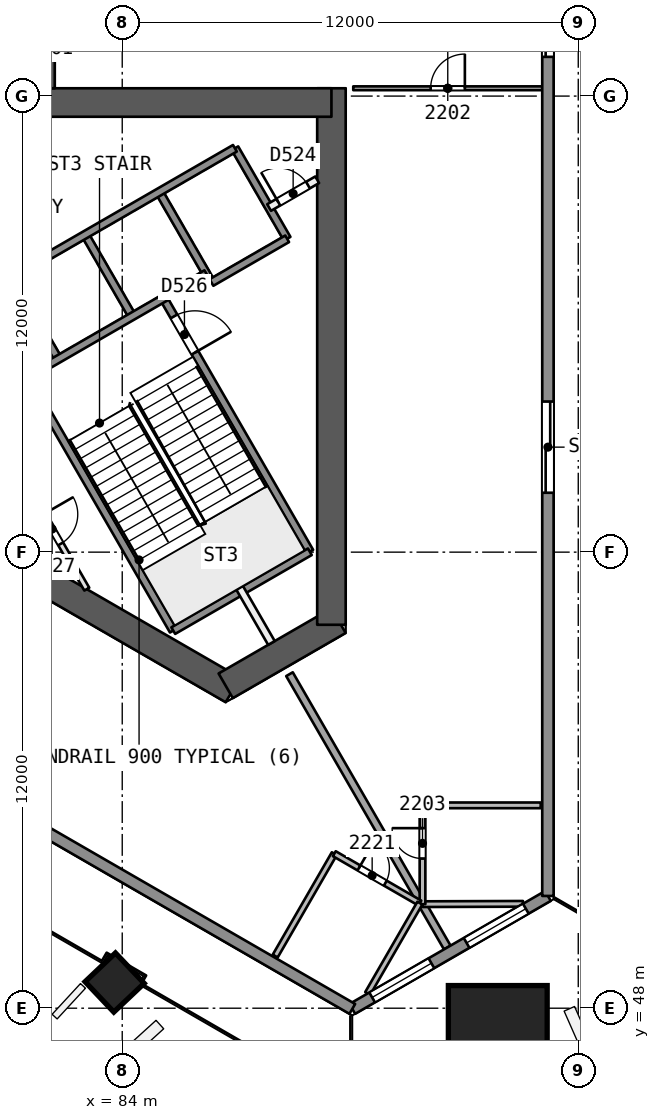
"""IFC4 building model, lengths in metres.
Left out: names, types, materials, properties, quantities, classifications, styles, units other than length and angle.
Written with IfcOpenShell. Run it as: python <this file> out.ifc"""

import sys

from ifc_helpers import new_model, si_unit, direction, frame, frame_2d, origin, origin_2d, place, context, subcontext, project, spatial, rectangle, extrude, element, fill, save


model = new_model("IFC4")
c1 = context("Model", 3, precision=1e-05, world=origin(), true_north=direction((0.0, 1.0)))
c2 = subcontext(c1, "Body", "Model", "MODEL_VIEW")
j1 = project(units=[si_unit("LENGTHUNIT", "METRE"), si_unit("PLANEANGLEUNIT", "RADIAN")], contexts=[c1])
p1 = place(None, origin())
s1 = spatial("IfcSite", under=j1, at=p1, CompositionType="ELEMENT")
p2 = place(p1, origin())
s2 = spatial("IfcBuilding", under=s1, at=p2, CompositionType="ELEMENT")
p3 = place(p2, frame((0.0, 0.0, 94.3)))
s3 = spatial("IfcBuildingStorey", under=s2, at=p3, CompositionType="ELEMENT", Elevation=94.3)
p4 = place(p3, frame((74.822, 63.354, 0.0), z_axis=(0.0, 0.0, 1.0), x_axis=(0.8660248072, -0.500001033313, 0.0)))
e1 = element("IfcWall", 1, at=p4, inside=s3, PredefinedType="SHEAR", context=c2, shape_type="SweptSolid", body=[
    extrude(rectangle(XDim=13.958, YDim=0.75, at=frame_2d((6.979, 0.0))), origin(), (0.0, 0.0, 1.0), 3.7),
])
p5 = place(p3, frame((86.723, 56.483, 0.0), z_axis=(0.0, 0.0, 1.0), x_axis=(0.866017201164, 0.500014207086, 0.0)))
e2 = element("IfcWall", 2, at=p5, inside=s3, PredefinedType="SHEAR", context=c2, shape_type="SweptSolid", body=[
    extrude(rectangle(XDim=3.429, YDim=0.75, at=frame_2d((1.714, 0.0))), origin(), (0.0, 0.0, 1.0), 3.7),
])
p6 = place(p3, frame((89.505, 58.089, 0.0), z_axis=(0.0, 0.0, 1.0), x_axis=(0.0, 1.0, 0.0)))
e3 = element("IfcWall", 3, at=p6, inside=s3, PredefinedType="SHEAR", context=c2, shape_type="SweptSolid", body=[
    extrude(rectangle(XDim=14.117, YDim=0.75, at=frame_2d((7.059, 0.0))), origin(), (0.0, 0.0, 1.0), 3.7),
])
p7 = place(p3, frame((89.505, 71.831, 0.0), z_axis=(0.0, 0.0, 1.0), x_axis=(-1.0, 0.0, 0.0)))
e4 = element("IfcWall", 4, at=p7, inside=s3, PredefinedType="SHEAR", context=c2, shape_type="SweptSolid", body=[
    extrude(rectangle(XDim=10.005, YDim=0.75, at=frame_2d((5.002, 0.0))), origin(), (0.0, 0.0, 1.0), 3.7),
])
p8 = place(p7, frame((7.855, 0.0, 0.0)))
e5 = element("IfcOpeningElement", 5, at=p8, cuts=e4, PredefinedType="OPENING", context=c2, shape_type="SweptSolid", body=[
    extrude(rectangle(XDim=1.2, YDim=2.1, at=frame_2d((0.6, 1.05))), frame((0.0, 0.385, 0.0), z_axis=(0.0, -1.0, 0.0), x_axis=(1.0, 0.0, 0.0)), (0.0, 0.0, 1.0), 0.771),
])
p9 = place(p3, frame((82.1, 72.206, 0.0), z_axis=(0.0, 0.0, 1.0), x_axis=(0.0, 1.0, 0.0)))
e6 = element("IfcWall", 6, at=p9, inside=s3, PredefinedType="SHEAR", context=c2, shape_type="SweptSolid", body=[
    extrude(rectangle(XDim=15.588, YDim=0.25, at=frame_2d((7.794, 0.0))), origin(), (0.0, 0.0, 1.0), 3.25),
])
p10 = place(p9, frame((1.527, 0.0, 0.0)))
e7 = element("IfcOpeningElement", 7, at=p10, cuts=e6, PredefinedType="OPENING", context=c2, shape_type="SweptSolid", body=[
    extrude(rectangle(XDim=1.0, YDim=2.1, at=frame_2d((0.5, 1.05))), frame((0.0, 0.135, 0.0), z_axis=(0.0, -1.0, 0.0), x_axis=(1.0, 0.0, 0.0)), (0.0, 0.0, 1.0), 0.271),
])
p11 = place(p9, frame((8.694, 0.0, 0.0)))
e8 = element("IfcOpeningElement", 8, at=p11, cuts=e6, PredefinedType="OPENING", context=c2, shape_type="SweptSolid", body=[
    extrude(rectangle(XDim=1.1, YDim=2.1, at=frame_2d((0.55, 1.05))), frame((0.0, 0.135, 0.0), z_axis=(0.0, -1.0, 0.0), x_axis=(1.0, 0.0, 0.0)), (0.0, 0.0, 1.0), 0.271),
])
p12 = place(p9, frame((13.062, 0.0, 0.0)))
e9 = element("IfcOpeningElement", 9, at=p12, cuts=e6, PredefinedType="OPENING", context=c2, shape_type="SweptSolid", body=[
    extrude(rectangle(XDim=1.0, YDim=2.1, at=frame_2d((0.5, 1.05))), frame((0.0, 0.135, 0.0), z_axis=(0.0, -1.0, 0.0), x_axis=(1.0, 0.0, 0.0)), (0.0, 0.0, 1.0), 0.271),
])
p13 = place(p3, frame((83.81, 48.642, 0.0), z_axis=(-0.00837646992, 0.028097450282, 0.999570091609), x_axis=(-0.49967642562, -0.865977626468, 0.020154903518)))
e10 = element("IfcColumn", 10, at=p13, inside=s3, PredefinedType="COLUMN", context=c2, shape_type="SweptSolid", body=[
    extrude(rectangle(XDim=1.1, YDim=1.1, at=origin_2d()), origin(), (0.0, 0.0, 1.0), 3.702),
])
p14 = place(p3, frame((93.903, 47.259, 0.0), z_axis=(-0.017607037296, 0.030466109479, 0.999380712447), x_axis=(0.500061328599, -0.865274797998, 0.035187946645)))
e11 = element("IfcColumn", 11, at=p14, inside=s3, PredefinedType="COLUMN", context=c2, shape_type="SweptSolid", body=[
    extrude(rectangle(XDim=2.6, YDim=2.6, at=origin_2d()), origin(), (0.0, 0.0, 1.0), 3.702),
])
p15 = place(p3, frame((90.079, 72.206, 0.0), z_axis=(0.0, 0.0, 1.0), x_axis=(1.0, 0.0, 0.0)))
e12 = element("IfcWall", 12, at=p15, inside=s3, PredefinedType="PARTITIONING", context=c2, shape_type="SweptSolid", body=[
    extrude(rectangle(XDim=4.974, YDim=0.1, at=frame_2d((2.487, 0.0))), origin(), (0.0, 0.0, 1.0), 3.25),
])
p16 = place(p15, frame((2.037, 0.0, 0.0)))
e13 = element("IfcOpeningElement", 13, at=p16, cuts=e12, PredefinedType="OPENING", context=c2, shape_type="SweptSolid", body=[
    extrude(rectangle(XDim=0.9, YDim=2.1, at=frame_2d((0.45, 1.05))), frame((0.0, 0.061, 0.0), z_axis=(0.0, -1.0, 0.0), x_axis=(1.0, 0.0, 0.0)), (0.0, 0.0, 1.0), 0.121),
])
p17 = place(p3, frame((94.545, 50.747, 0.0), z_axis=(0.0, 0.0, 1.0), x_axis=(-0.999994472164, -0.003325002401, 0.0)))
e14 = element("IfcWall", 14, at=p17, inside=s3, PredefinedType="PARTITIONING", context=c2, shape_type="SweptSolid", body=[
    extrude(rectangle(XDim=2.643, YDim=0.15, at=frame_2d((1.322, 0.0))), origin(), (0.0, 0.0, 1.0), 3.25),
])
p18 = place(p3, frame((91.902, 50.738, 0.0), z_axis=(0.0, 0.0, 1.0), x_axis=(0.0, 1.0, 0.0)))
e15 = element("IfcWall", 15, at=p18, inside=s3, PredefinedType="PARTITIONING", context=c2, shape_type="SweptSolid", body=[
    extrude(rectangle(XDim=2.6, YDim=0.15, at=frame_2d((1.3, 0.0))), origin(), (0.0, 0.0, 1.0), 3.25),
])
p19 = place(p18, frame((1.2, 0.0, 0.0)))
e16 = element("IfcOpeningElement", 16, at=p19, cuts=e15, PredefinedType="OPENING", context=c2, shape_type="SweptSolid", body=[
    extrude(rectangle(XDim=0.8, YDim=2.1, at=frame_2d((0.4, 1.05))), frame((0.0, 0.085, 0.0), z_axis=(0.0, -1.0, 0.0), x_axis=(1.0, 0.0, 0.0)), (0.0, 0.0, 1.0), 0.171),
])
p20 = place(p3, frame((91.902, 53.338, 0.0), z_axis=(0.0, 0.0, 1.0), x_axis=(1.0, 0.0, 0.0)))
e17 = element("IfcWall", 17, at=p20, inside=s3, PredefinedType="PARTITIONING", context=c2, shape_type="SweptSolid", body=[
    extrude(rectangle(XDim=3.11, YDim=0.15, at=frame_2d((1.555, 0.0))), origin(), (0.0, 0.0, 1.0), 3.25),
])
p21 = place(p3, frame((88.401, 56.789, 0.0), z_axis=(0.0, 0.0, 1.0), x_axis=(0.499996437432, -0.866027460624, 0.0)))
e18 = element("IfcWall", 18, at=p21, inside=s3, PredefinedType="PARTITIONING", context=c2, shape_type="SweptSolid", body=[
    extrude(rectangle(XDim=8.305, YDim=0.2, at=frame_2d((4.152, 0.0))), origin(), (0.0, 0.0, 1.0), 3.25),
])
p22 = place(p3, frame((88.025, 49.372, 0.0), z_axis=(0.0, 0.0, 1.0), x_axis=(0.500005562063, 0.866022192502, 0.0)))
e19 = element("IfcWall", 19, at=p22, inside=s3, PredefinedType="PARTITIONING", context=c2, shape_type="SweptSolid", body=[
    extrude(rectangle(XDim=3.11, YDim=0.15, at=frame_2d((1.555, 0.0))), origin(), (0.0, 0.0, 1.0), 3.25),
])
p23 = place(p3, frame((89.581, 52.066, 0.0), z_axis=(0.0, 0.0, 1.0), x_axis=(0.866021400173, -0.500006934395, 0.0)))
e20 = element("IfcWall", 20, at=p23, inside=s3, PredefinedType="PARTITIONING", context=c2, shape_type="SweptSolid", body=[
    extrude(rectangle(XDim=2.6, YDim=0.15, at=frame_2d((1.3, 0.0))), origin(), (0.0, 0.0, 1.0), 3.25),
])
p24 = place(p23, frame((0.75, 0.0, 0.0)))
e21 = element("IfcOpeningElement", 21, at=p24, cuts=e20, PredefinedType="OPENING", context=c2, shape_type="SweptSolid", body=[
    extrude(rectangle(XDim=0.8, YDim=2.1, at=frame_2d((0.4, 1.05))), frame((0.0, 0.085, 0.0), z_axis=(0.0, -1.0, 0.0), x_axis=(1.0, 0.0, 0.0)), (0.0, 0.0, 1.0), 0.171),
])
p25 = place(p3, frame((91.832, 50.766, 0.0), z_axis=(0.0, 0.0, 1.0), x_axis=(-0.500002068897, -0.866024209303, 0.0)))
e22 = element("IfcWall", 22, at=p25, inside=s3, PredefinedType="PARTITIONING", context=c2, shape_type="SweptSolid", body=[
    extrude(rectangle(XDim=2.746, YDim=0.15, at=frame_2d((1.373, 0.0))), origin(), (0.0, 0.0, 1.0), 3.25),
])
p26 = place(p3, frame((95.202, 50.954, 0.0), z_axis=(0.0, 0.0, 1.0), x_axis=(-0.866025542078, -0.499999760469, 0.0)))
e23 = element("IfcWall", 23, at=p26, inside=s3, PredefinedType="SOLIDWALL", context=c2, shape_type="SweptSolid", body=[
    extrude(rectangle(XDim=5.944, YDim=0.3, at=frame_2d((2.972, 0.0))), origin(), (0.0, 0.0, 1.0), 3.25),
])
p27 = place(p26, frame((0.671, 0.0, 0.9)))
e24 = element("IfcOpeningElement", 24, at=p27, cuts=e23, PredefinedType="OPENING", context=c2, shape_type="SweptSolid", body=[
    extrude(rectangle(XDim=1.8, YDim=1.5, at=frame_2d((0.9, 0.75))), frame((0.0, 0.161, 0.0), z_axis=(0.0, -1.0, 0.0), x_axis=(1.0, 0.0, 0.0)), (0.0, 0.0, 1.0), 0.321),
])
p28 = place(p26, frame((3.541, 0.0, 0.9)))
e25 = element("IfcOpeningElement", 25, at=p28, cuts=e23, PredefinedType="OPENING", context=c2, shape_type="SweptSolid", body=[
    extrude(rectangle(XDim=1.8, YDim=1.5, at=frame_2d((0.9, 0.75))), frame((0.0, 0.161, 0.0), z_axis=(0.0, -1.0, 0.0), x_axis=(1.0, 0.0, 0.0)), (0.0, 0.0, 1.0), 0.321),
])
p29 = place(p3, frame((95.202, 109.046, 0.0), z_axis=(0.0, 0.0, 1.0), x_axis=(0.0, -1.0, 0.0)))
e26 = element("IfcWall", 26, at=p29, inside=s3, PredefinedType="SOLIDWALL", context=c2, shape_type="SweptSolid", body=[
    extrude(rectangle(XDim=58.093, YDim=0.3, at=frame_2d((29.046, 0.0))), origin(), (0.0, 0.0, 1.0), 3.25),
])
p30 = place(p29, frame((27.846, 0.0, 0.0)))
e27 = element("IfcOpeningElement", 27, at=p30, cuts=e26, PredefinedType="OPENING", context=c2, shape_type="SweptSolid", body=[
    extrude(rectangle(XDim=2.4, YDim=2.4, at=frame_2d((1.2, 1.2))), frame((0.0, 0.161, 0.0), z_axis=(0.0, -1.0, 0.0), x_axis=(1.0, 0.0, 0.0)), (0.0, 0.0, 1.0), 0.321),
])
p31 = place(p29, frame((33.614, 0.0, 0.0)))
e28 = element("IfcOpeningElement", 28, at=p31, cuts=e26, PredefinedType="OPENING", context=c2, shape_type="SweptSolid", body=[
    extrude(rectangle(XDim=2.4, YDim=2.4, at=frame_2d((1.2, 1.2))), frame((0.0, 0.161, 0.0), z_axis=(0.0, -1.0, 0.0), x_axis=(1.0, 0.0, 0.0)), (0.0, 0.0, 1.0), 0.321),
])
p32 = place(p29, frame((45.083, 0.0, 0.0)))
e29 = element("IfcOpeningElement", 29, at=p32, cuts=e26, PredefinedType="OPENING", context=c2, shape_type="SweptSolid", body=[
    extrude(rectangle(XDim=2.4, YDim=2.4, at=frame_2d((1.2, 1.2))), frame((0.0, 0.161, 0.0), z_axis=(0.0, -1.0, 0.0), x_axis=(1.0, 0.0, 0.0)), (0.0, 0.0, 1.0), 0.321),
])
p33 = place(p29, frame((22.079, 0.0, 0.0)))
e30 = element("IfcOpeningElement", 30, at=p33, cuts=e26, PredefinedType="OPENING", context=c2, shape_type="SweptSolid", body=[
    extrude(rectangle(XDim=2.4, YDim=2.4, at=frame_2d((1.2, 1.2))), frame((0.0, 0.161, 0.0), z_axis=(0.0, -1.0, 0.0), x_axis=(1.0, 0.0, 0.0)), (0.0, 0.0, 1.0), 0.321),
])
p34 = place(p29, frame((10.643, 0.0, 0.0)))
e31 = element("IfcOpeningElement", 31, at=p34, cuts=e26, PredefinedType="OPENING", context=c2, shape_type="SweptSolid", body=[
    extrude(rectangle(XDim=2.4, YDim=2.4, at=frame_2d((1.2, 1.2))), frame((0.0, 0.161, 0.0), z_axis=(0.0, -1.0, 0.0), x_axis=(1.0, 0.0, 0.0)), (0.0, 0.0, 1.0), 0.321),
])
p35 = place(p3, frame((90.054, 47.981, 0.0), z_axis=(0.0, 0.0, 1.0), x_axis=(-0.866025390357, 0.500000023256, 0.0)))
e32 = element("IfcWall", 32, at=p35, inside=s3, PredefinedType="SOLIDWALL", context=c2, shape_type="SweptSolid", body=[
    extrude(rectangle(XDim=58.093, YDim=0.3, at=frame_2d((29.046, 0.0))), origin(), (0.0, 0.0, 1.0), 3.25),
])
p36 = place(p35, frame((43.972, 0.0, 0.0)))
e33 = element("IfcOpeningElement", 33, at=p36, cuts=e32, PredefinedType="OPENING", context=c2, shape_type="SweptSolid", body=[
    extrude(rectangle(XDim=2.4, YDim=2.4, at=frame_2d((1.2, 1.2))), frame((0.0, 0.161, 0.0), z_axis=(0.0, -1.0, 0.0), x_axis=(1.0, 0.0, 0.0)), (0.0, 0.0, 1.0), 0.321),
])
p37 = place(p35, frame((22.39, 0.0, 0.0)))
e34 = element("IfcOpeningElement", 34, at=p37, cuts=e32, PredefinedType="OPENING", context=c2, shape_type="SweptSolid", body=[
    extrude(rectangle(XDim=2.4, YDim=2.4, at=frame_2d((1.2, 1.2))), frame((0.0, 0.161, 0.0), z_axis=(0.0, -1.0, 0.0), x_axis=(1.0, 0.0, 0.0)), (0.0, 0.0, 1.0), 0.321),
])
p38 = place(p35, frame((10.643, 0.0, 0.0)))
e35 = element("IfcOpeningElement", 35, at=p38, cuts=e32, PredefinedType="OPENING", context=c2, shape_type="SweptSolid", body=[
    extrude(rectangle(XDim=2.4, YDim=2.4, at=frame_2d((1.2, 1.2))), frame((0.0, 0.161, 0.0), z_axis=(0.0, -1.0, 0.0), x_axis=(1.0, 0.0, 0.0)), (0.0, 0.0, 1.0), 0.321),
])
p39 = place(p35, frame((29.705, 0.0, 0.9)))
e36 = element("IfcOpeningElement", 36, at=p39, cuts=e32, PredefinedType="OPENING", context=c2, shape_type="SweptSolid", body=[
    extrude(rectangle(XDim=1.8, YDim=1.5, at=frame_2d((0.9, 0.75))), frame((0.0, 0.161, 0.0), z_axis=(0.0, -1.0, 0.0), x_axis=(1.0, 0.0, 0.0)), (0.0, 0.0, 1.0), 0.321),
])
p40 = place(p35, frame((26.587, 0.0, 0.9)))
e37 = element("IfcOpeningElement", 37, at=p40, cuts=e32, PredefinedType="OPENING", context=c2, shape_type="SweptSolid", body=[
    extrude(rectangle(XDim=1.8, YDim=1.5, at=frame_2d((0.9, 0.75))), frame((0.0, 0.161, 0.0), z_axis=(0.0, -1.0, 0.0), x_axis=(1.0, 0.0, 0.0)), (0.0, 0.0, 1.0), 0.321),
])
p41 = place(p3, frame((81.269, 62.142, 0.0), z_axis=(0.0, 0.0, 1.0), x_axis=(0.500043557135, -0.866000254601, 0.0)))
e38 = element("IfcWall", 38, at=p41, inside=s3, PredefinedType="PARTITIONING", context=c2, shape_type="SweptSolid", body=[
    extrude(rectangle(XDim=3.598, YDim=0.15, at=frame_2d((1.799, 0.0))), origin(), (0.0, 0.0, 1.0), 3.25),
])
p42 = place(p41, frame((1.322, 0.0, 0.0)))
e39 = element("IfcOpeningElement", 39, at=p42, cuts=e38, PredefinedType="OPENING", context=c2, shape_type="SweptSolid", body=[
    extrude(rectangle(XDim=0.9, YDim=2.1, at=frame_2d((0.45, 1.05))), frame((0.0, 0.085, 0.0), z_axis=(0.0, -1.0, 0.0), x_axis=(1.0, 0.0, 0.0)), (0.0, 0.0, 1.0), 0.171),
])
p43 = place(p3, frame((81.493, 64.604, 0.0), z_axis=(0.0, 0.0, 1.0), x_axis=(0.500006057782, -0.866021906294, 0.0)))
e40 = element("IfcWall", 40, at=p43, inside=s3, PredefinedType="SOLIDWALL", context=c2, shape_type="SweptSolid", body=[
    extrude(rectangle(XDim=7.7, YDim=0.2, at=frame_2d((3.85, 0.0))), origin(), (0.0, 0.0, 1.0), 3.25),
])
p44 = place(p3, frame((81.076, 67.227, 0.0), z_axis=(0.0, 0.0, 1.0), x_axis=(0.50000366821, -0.866023285932, 0.0)))
e41 = element("IfcWall", 41, at=p44, inside=s3, PredefinedType="SOLIDWALL", context=c2, shape_type="SweptSolid", body=[
    extrude(rectangle(XDim=2.48, YDim=0.2, at=frame_2d((1.24, 0.0))), origin(), (0.0, 0.0, 1.0), 3.25),
])
p45 = place(p3, frame((87.09, 59.06, 0.0), z_axis=(0.0, 0.0, 1.0), x_axis=(0.499937194881, -0.866061661301, 0.0)))
e42 = element("IfcWall", 42, at=p45, inside=s3, PredefinedType="PARTITIONING", context=c2, shape_type="SweptSolid", body=[
    extrude(rectangle(XDim=1.673, YDim=0.2, at=frame_2d((0.836, 0.0))), origin(), (0.0, 0.0, 1.0), 3.25),
])
p46 = place(p3, frame((83.024, 68.352, 0.0), z_axis=(0.0, 0.0, 1.0), x_axis=(0.50000366821, -0.866023285932, 0.0)))
e43 = element("IfcWall", 43, at=p46, inside=s3, PredefinedType="SOLIDWALL", context=c2, shape_type="SweptSolid", body=[
    extrude(rectangle(XDim=2.48, YDim=0.2, at=frame_2d((1.24, 0.0))), origin(), (0.0, 0.0, 1.0), 3.25),
])
p47 = place(p3, frame((85.087, 66.679, 0.0), z_axis=(0.0, 0.0, 1.0), x_axis=(0.500019787375, -0.866013979237, 0.0)))
e44 = element("IfcWall", 44, at=p47, inside=s3, PredefinedType="SOLIDWALL", context=c2, shape_type="SweptSolid", body=[
    extrude(rectangle(XDim=7.7, YDim=0.2, at=frame_2d((3.85, 0.0))), origin(), (0.0, 0.0, 1.0), 3.25),
])
p48 = place(p47, frame((0.55, 0.0, 0.0)))
e45 = element("IfcOpeningElement", 45, at=p48, cuts=e44, PredefinedType="OPENING", context=c2, shape_type="SweptSolid", body=[
    extrude(rectangle(XDim=1.1, YDim=2.1, at=frame_2d((0.55, 1.05))), frame((0.0, 0.11, 0.0), z_axis=(0.0, -1.0, 0.0), x_axis=(1.0, 0.0, 0.0)), (0.0, 0.0, 1.0), 0.221),
])
for number, where, z_axis, x_axis in (
    (46, (84.973, 69.477, 0.0), (0.0, 0.0, 1.0), (0.5, -0.866, 0.0)),
    (47, (86.965, 70.626, 0.0), (0.0, 0.0, 1.0), (0.5, -0.866, 0.0)),
):
    element("IfcWall", number, at=place(p3, frame(where, z_axis=z_axis, x_axis=x_axis)), inside=s3, PredefinedType="SOLIDWALL", context=c2, shape_type="SweptSolid", body=[
        extrude(rectangle(XDim=2.75, YDim=0.2, at=frame_2d((1.375, 0.0))), origin(), (0.0, 0.0, 1.0), 3.25),
    ])
p49 = place(p3, frame((77.135, 64.952, 0.0), z_axis=(0.0, 0.0, 1.0), x_axis=(0.866031916153, 0.499988720078, 0.0)))
e48 = element("IfcWall", 48, at=p49, inside=s3, PredefinedType="SOLIDWALL", context=c2, shape_type="SweptSolid", body=[
    extrude(rectangle(XDim=11.35, YDim=0.2, at=frame_2d((5.675, 0.0))), origin(), (0.0, 0.0, 1.0), 3.25),
])
p50 = place(p3, frame((87.865, 69.068, 0.0), z_axis=(0.0, 0.0, 1.0), x_axis=(0.865982457891, 0.500074377092, 0.0)))
e49 = element("IfcWall", 49, at=p50, inside=s3, PredefinedType="PARTITIONING", context=c2, shape_type="SweptSolid", body=[
    extrude(rectangle(XDim=1.461, YDim=0.2, at=frame_2d((0.73, 0.0))), origin(), (0.0, 0.0, 1.0), 3.25),
])
p51 = place(p50, frame((0.281, 0.0, 0.0)))
e50 = element("IfcOpeningElement", 50, at=p51, cuts=e49, PredefinedType="OPENING", context=c2, shape_type="SweptSolid", body=[
    extrude(rectangle(XDim=0.9, YDim=2.1, at=frame_2d((0.45, 1.05))), frame((0.0, 0.11, 0.0), z_axis=(0.0, -1.0, 0.0), x_axis=(1.0, 0.0, 0.0)), (0.0, 0.0, 1.0), 0.221),
])
p52 = place(p3, frame((80.367, 63.954, 0.0), z_axis=(0.0, 0.0, 1.0), x_axis=(0.866026575979, 0.499997969693, 0.0)))
e51 = element("IfcWall", 51, at=p52, inside=s3, PredefinedType="SOLIDWALL", context=c2, shape_type="SweptSolid", body=[
    extrude(rectangle(XDim=6.75, YDim=0.2, at=frame_2d((3.375, 0.0))), origin(), (0.0, 0.0, 1.0), 3.25),
])
p53 = place(p3, frame((86.348, 67.095, 0.0), z_axis=(0.0, 0.0, 1.0), x_axis=(0.86602648383, 0.499998129301, 0.0)))
e52 = element("IfcWall", 52, at=p53, inside=s3, PredefinedType="SOLIDWALL", context=c2, shape_type="SweptSolid", body=[
    extrude(rectangle(XDim=2.3, YDim=0.2, at=frame_2d((1.15, 0.0))), origin(), (0.0, 0.0, 1.0), 3.25),
])
p54 = place(p3, frame((85.343, 57.935, 0.0), z_axis=(0.0, 0.0, 1.0), x_axis=(0.866004344652, 0.500036473714, 0.0)))
e53 = element("IfcWall", 53, at=p54, inside=s3, PredefinedType="SOLIDWALL", context=c2, shape_type="SweptSolid", body=[
    extrude(rectangle(XDim=4.15, YDim=0.2, at=frame_2d((2.075, 0.0))), origin(), (0.0, 0.0, 1.0), 3.25),
])
p55 = place(p16, origin())
e54 = element("IfcDoor", 54, at=p55, inside=s3, OperationType="SINGLE_SWING_RIGHT", PredefinedType="NOTDEFINED", context=c2, shape_type="SweptSolid", body=[
    extrude(rectangle(XDim=0.9, YDim=2.1, at=frame_2d((0.45, 1.05))), frame((0.0, 0.025, 0.0), z_axis=(0.0, -1.0, 0.0), x_axis=(1.0, 0.0, 0.0)), (0.0, 0.0, 1.0), 0.05),
])
fill(e13, e54)
p56 = place(p19, origin())
e55 = element("IfcDoor", 55, at=p56, inside=s3, OperationType="SINGLE_SWING_RIGHT", PredefinedType="NOTDEFINED", context=c2, shape_type="SweptSolid", body=[
    extrude(rectangle(XDim=0.8, YDim=2.1, at=frame_2d((0.4, 1.05))), frame((0.0, 0.025, 0.0), z_axis=(0.0, -1.0, 0.0), x_axis=(1.0, 0.0, 0.0)), (0.0, 0.0, 1.0), 0.05),
])
fill(e16, e55)
p57 = place(p24, origin())
e56 = element("IfcDoor", 56, at=p57, inside=s3, OperationType="SINGLE_SWING_LEFT", PredefinedType="NOTDEFINED", context=c2, shape_type="SweptSolid", body=[
    extrude(rectangle(XDim=0.8, YDim=2.1, at=frame_2d((0.4, 1.05))), frame((0.0, 0.025, 0.0), z_axis=(0.0, -1.0, 0.0), x_axis=(1.0, 0.0, 0.0)), (0.0, 0.0, 1.0), 0.05),
])
fill(e21, e56)
p58 = place(p27, origin())
e57 = element("IfcWindow", 57, at=p58, inside=s3, PartitioningType="SINGLE_PANEL", PredefinedType="WINDOW", context=c2, shape_type="SweptSolid", body=[
    extrude(rectangle(XDim=1.8, YDim=1.5, at=frame_2d((0.9, 0.75))), frame((0.0, 0.03, 0.0), z_axis=(0.0, -1.0, 0.0), x_axis=(1.0, 0.0, 0.0)), (0.0, 0.0, 1.0), 0.06),
])
fill(e24, e57)
p59 = place(p28, origin())
e58 = element("IfcWindow", 58, at=p59, inside=s3, PartitioningType="SINGLE_PANEL", PredefinedType="WINDOW", context=c2, shape_type="SweptSolid", body=[
    extrude(rectangle(XDim=1.8, YDim=1.5, at=frame_2d((0.9, 0.75))), frame((0.0, 0.03, 0.0), z_axis=(0.0, -1.0, 0.0), x_axis=(1.0, 0.0, 0.0)), (0.0, 0.0, 1.0), 0.06),
])
fill(e25, e58)
p60 = place(p31, origin())
e59 = element("IfcDoor", 59, at=p60, inside=s3, OperationType="SLIDING_TO_RIGHT", PredefinedType="NOTDEFINED", context=c2, shape_type="SweptSolid", body=[
    extrude(rectangle(XDim=2.4, YDim=2.4, at=frame_2d((1.2, 1.2))), frame((0.0, 0.025, 0.0), z_axis=(0.0, -1.0, 0.0), x_axis=(1.0, 0.0, 0.0)), (0.0, 0.0, 1.0), 0.05),
])
fill(e28, e59)
p61 = place(p32, origin())
e60 = element("IfcDoor", 60, at=p61, inside=s3, OperationType="SLIDING_TO_LEFT", PredefinedType="NOTDEFINED", context=c2, shape_type="SweptSolid", body=[
    extrude(rectangle(XDim=2.4, YDim=2.4, at=frame_2d((1.2, 1.2))), frame((0.0, 0.025, 0.0), z_axis=(0.0, -1.0, 0.0), x_axis=(1.0, 0.0, 0.0)), (0.0, 0.0, 1.0), 0.05),
])
fill(e29, e60)
p62 = place(p51, origin())
e61 = element("IfcDoor", 61, at=p62, inside=s3, OperationType="SINGLE_SWING_LEFT", PredefinedType="NOTDEFINED", context=c2, shape_type="SweptSolid", body=[
    extrude(rectangle(XDim=0.9, YDim=2.1, at=frame_2d((0.45, 1.05))), frame((0.0, 0.025, 0.0), z_axis=(0.0, -1.0, 0.0), x_axis=(1.0, 0.0, 0.0)), (0.0, 0.0, 1.0), 0.05),
])
fill(e50, e61)
p63 = place(p48, origin())
e62 = element("IfcDoor", 62, at=p63, inside=s3, OperationType="SINGLE_SWING_RIGHT", PredefinedType="NOTDEFINED", context=c2, shape_type="SweptSolid", body=[
    extrude(rectangle(XDim=1.1, YDim=2.1, at=frame_2d((0.55, 1.05))), frame((0.0, 0.025, 0.0), z_axis=(0.0, -1.0, 0.0), x_axis=(1.0, 0.0, 0.0)), (0.0, 0.0, 1.0), 0.05),
])
fill(e45, e62)
p64 = place(p42, origin())
e63 = element("IfcDoor", 63, at=p64, inside=s3, OperationType="SINGLE_SWING_LEFT", PredefinedType="NOTDEFINED", context=c2, shape_type="SweptSolid", body=[
    extrude(rectangle(XDim=0.9, YDim=2.1, at=frame_2d((0.45, 1.05))), frame((0.0, 0.025, 0.0), z_axis=(0.0, -1.0, 0.0), x_axis=(1.0, 0.0, 0.0)), (0.0, 0.0, 1.0), 0.05),
])
fill(e39, e63)
save(model, sys.argv[1])
